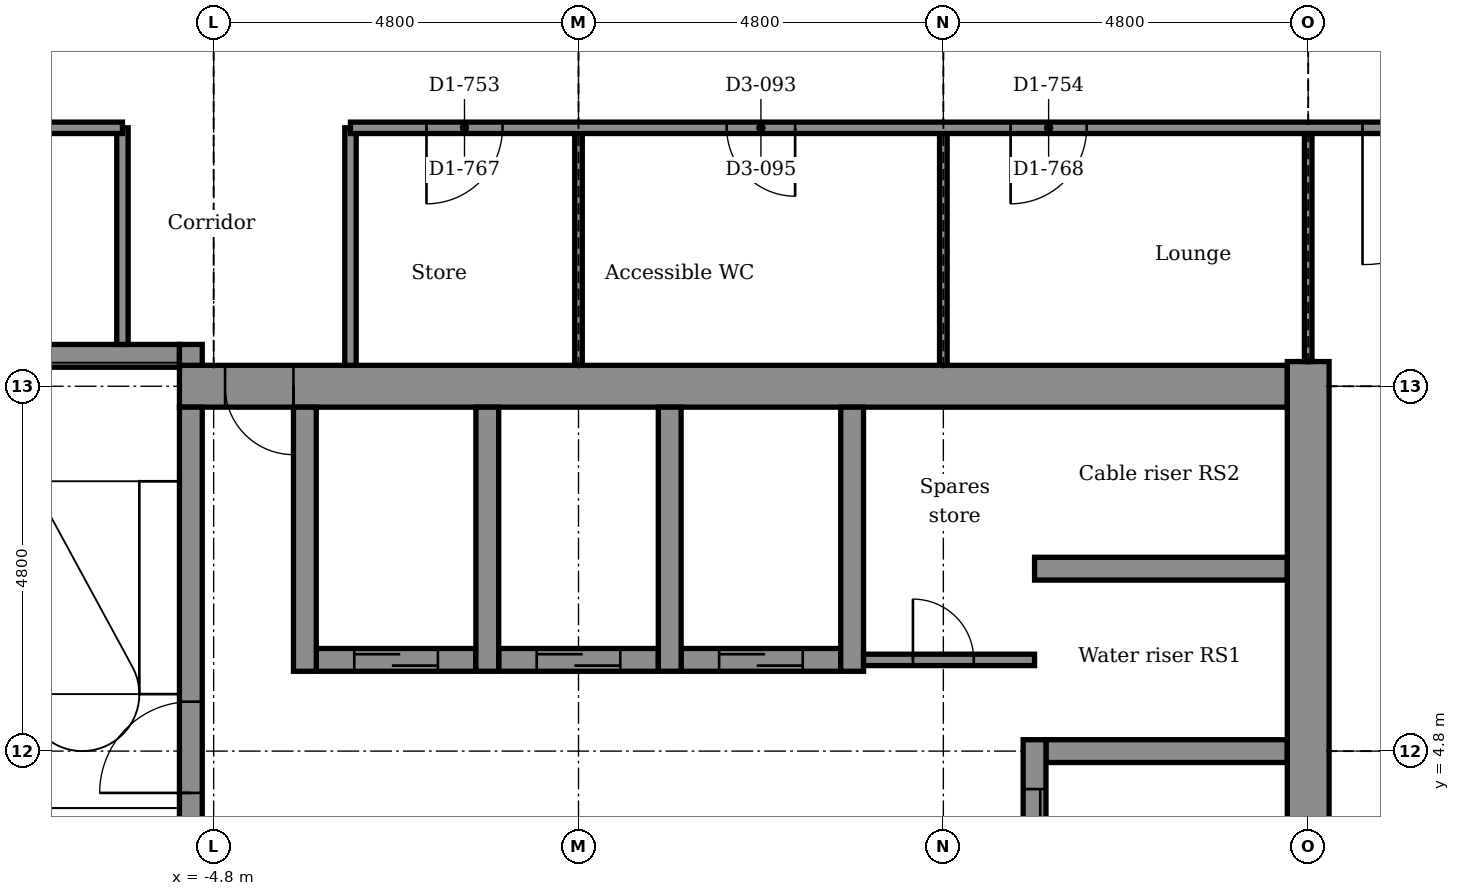
"""IFC4 building model, lengths in metres.
Left out: names, types, materials, properties, quantities, classifications, styles, units other than length and angle.
Written with IfcOpenShell. Run it as: python <this file> out.ifc"""

import sys

from ifc_helpers import new_model, si_unit, direction, frame, frame_2d, origin, place, context, subcontext, project, spatial, rectangle, extrude, element, fill, save


model = new_model("IFC4")
c1 = context("Model", 3, precision=1e-05, world=origin(), true_north=direction((0.0, 1.0)))
c2 = subcontext(c1, "Body", "Model", "MODEL_VIEW")
j1 = project(units=[si_unit("LENGTHUNIT", "METRE"), si_unit("PLANEANGLEUNIT", "RADIAN")], contexts=[c1])
p1 = place(None, origin())
s1 = spatial("IfcSite", under=j1, at=p1, CompositionType="ELEMENT")
p2 = place(p1, origin())
s2 = spatial("IfcBuilding", under=s1, at=p2, CompositionType="ELEMENT")
p3 = place(p2, frame((0.0, 0.0, 289.1)))
s3 = spatial("IfcBuildingStorey", under=s2, at=p3, CompositionType="ELEMENT", Elevation=289.1)
p4 = place(p3, frame((6.15, 4.8, -0.15), z_axis=(0.0, 0.0, 1.0), x_axis=(1.0, 0.0, 0.0)))
e1 = element("IfcWall", 1, at=p4, inside=s3, PredefinedType="STANDARD", context=c2, shape_type="SweptSolid", body=[
    extrude(rectangle(XDim=3.175, YDim=0.3, at=frame_2d((1.587, 0.0))), origin(), (0.0, 0.0, 1.0), 3.9),
])
p5 = place(p3, frame((-3.45, 6.0, -0.15), z_axis=(0.0, 0.0, 1.0), x_axis=(1.0, 0.0, 0.0)))
e2 = element("IfcWall", 2, at=p5, inside=s3, PredefinedType="STANDARD", context=c2, shape_type="SweptSolid", body=[
    extrude(rectangle(XDim=2.1, YDim=0.3, at=frame_2d((1.05, 0.0))), origin(), (0.0, 0.0, 1.0), 3.9),
])
p6 = place(p5, frame((0.5, 0.0, 0.15)))
e3 = element("IfcOpeningElement", 3, at=p6, cuts=e2, PredefinedType="OPENING", context=c2, shape_type="SweptSolid", body=[
    extrude(rectangle(XDim=1.1, YDim=2.1, at=frame_2d((0.55, 1.05))), frame((0.0, 0.16, 0.0), z_axis=(0.0, -1.0, 0.0), x_axis=(1.0, 0.0, 0.0)), (0.0, 0.0, 1.0), 0.32),
])
p7 = place(p3, frame((-1.05, 6.0, -0.15), z_axis=(0.0, 0.0, 1.0), x_axis=(1.0, 0.0, 0.0)))
e4 = element("IfcWall", 4, at=p7, inside=s3, PredefinedType="STANDARD", context=c2, shape_type="SweptSolid", body=[
    extrude(rectangle(XDim=2.1, YDim=0.3, at=frame_2d((1.05, 0.0))), origin(), (0.0, 0.0, 1.0), 3.9),
])
p8 = place(p7, frame((0.5, 0.0, 0.15)))
e5 = element("IfcOpeningElement", 5, at=p8, cuts=e4, PredefinedType="OPENING", context=c2, shape_type="SweptSolid", body=[
    extrude(rectangle(XDim=1.1, YDim=2.1, at=frame_2d((0.55, 1.05))), frame((0.0, 0.16, 0.0), z_axis=(0.0, -1.0, 0.0), x_axis=(1.0, 0.0, 0.0)), (0.0, 0.0, 1.0), 0.32),
])
p9 = place(p3, frame((1.35, 6.0, -0.15), z_axis=(0.0, 0.0, 1.0), x_axis=(1.0, 0.0, 0.0)))
e6 = element("IfcWall", 6, at=p9, inside=s3, PredefinedType="STANDARD", context=c2, shape_type="SweptSolid", body=[
    extrude(rectangle(XDim=2.1, YDim=0.3, at=frame_2d((1.05, 0.0))), origin(), (0.0, 0.0, 1.0), 3.9),
])
p10 = place(p9, frame((0.5, 0.0, 0.15)))
e7 = element("IfcOpeningElement", 7, at=p10, cuts=e6, PredefinedType="OPENING", context=c2, shape_type="SweptSolid", body=[
    extrude(rectangle(XDim=1.1, YDim=2.1, at=frame_2d((0.55, 1.05))), frame((0.0, 0.16, 0.0), z_axis=(0.0, -1.0, 0.0), x_axis=(1.0, 0.0, 0.0)), (0.0, 0.0, 1.0), 0.32),
])
p11 = place(p3, frame((6.0, 7.2, -0.15), z_axis=(0.0, 0.0, 1.0), x_axis=(1.0, 0.0, 0.0)))
e8 = element("IfcWall", 8, at=p11, inside=s3, PredefinedType="STANDARD", context=c2, shape_type="SweptSolid", body=[
    extrude(rectangle(XDim=3.325, YDim=0.3, at=frame_2d((1.663, 0.0))), origin(), (0.0, 0.0, 1.0), 3.9),
])
p12 = place(p3, frame((-5.25, 9.6, -0.15), z_axis=(0.0, 0.0, 1.0), x_axis=(1.0, 0.0, 0.0)))
e9 = element("IfcWall", 9, at=p12, inside=s3, PredefinedType="SHEAR", context=c2, shape_type="SweptSolid", body=[
    extrude(rectangle(XDim=14.575, YDim=0.55, at=frame_2d((7.288, 0.0))), origin(), (0.0, 0.0, 1.0), 3.9),
])
p13 = place(p12, frame((0.6, 0.0, 0.15)))
e10 = element("IfcOpeningElement", 10, at=p13, cuts=e9, PredefinedType="OPENING", context=c2, shape_type="SweptSolid", body=[
    extrude(rectangle(XDim=0.9, YDim=2.1, at=frame_2d((0.45, 1.05))), frame((0.0, 0.285, 0.0), z_axis=(0.0, -1.0, 0.0), x_axis=(1.0, 0.0, 0.0)), (0.0, 0.0, 1.0), 0.57),
])
p14 = place(p3, frame((-9.325, 10.0, -0.15), z_axis=(0.0, 0.0, 1.0), x_axis=(1.0, 0.0, 0.0)))
e11 = element("IfcWall", 11, at=p14, inside=s3, PredefinedType="STANDARD", context=c2, shape_type="SweptSolid", body=[
    extrude(rectangle(XDim=4.075, YDim=0.3, at=frame_2d((2.038, 0.0))), origin(), (0.0, 0.0, 1.0), 3.9),
])
p15 = place(p3, frame((-5.1, 2.25, -0.15), z_axis=(0.0, 0.0, 1.0), x_axis=(0.0, 1.0, 0.0)))
e12 = element("IfcWall", 12, at=p15, inside=s3, PredefinedType="STANDARD", context=c2, shape_type="SweptSolid", body=[
    extrude(rectangle(XDim=7.075, YDim=0.3, at=frame_2d((3.538, 0.0))), origin(), (0.0, 0.0, 1.0), 3.9),
])
p16 = place(p15, frame((2.0, 0.0, 0.15)))
e13 = element("IfcOpeningElement", 13, at=p16, cuts=e12, PredefinedType="OPENING", context=c2, shape_type="SweptSolid", body=[
    extrude(rectangle(XDim=1.2, YDim=2.1, at=frame_2d((0.6, 1.05))), frame((0.0, 0.16, 0.0), z_axis=(0.0, -1.0, 0.0), x_axis=(1.0, 0.0, 0.0)), (0.0, 0.0, 1.0), 0.32),
])
p17 = place(p3, frame((-5.1, 9.875, -0.15), z_axis=(0.0, 0.0, 1.0), x_axis=(0.0, 1.0, 0.0)))
e14 = element("IfcWall", 14, at=p17, inside=s3, PredefinedType="STANDARD", context=c2, shape_type="SweptSolid", body=[
    extrude(rectangle(XDim=0.275, YDim=0.3, at=frame_2d((0.137, 0.0))), origin(), (0.0, 0.0, 1.0), 3.9),
])
for number, where, z_axis, x_axis in (
    (15, (-3.6, 5.85, -0.15), (0.0, 0.0, 1.0), (0.0, 1.0, 0.0)),
    (16, (-1.2, 5.85, -0.15), (0.0, 0.0, 1.0), (0.0, 1.0, 0.0)),
    (17, (1.2, 5.85, -0.15), (0.0, 0.0, 1.0), (0.0, 1.0, 0.0)),
    (18, (3.6, 5.85, -0.15), (0.0, 0.0, 1.0), (0.0, 1.0, 0.0)),
):
    element("IfcWall", number, at=place(p3, frame(where, z_axis=z_axis, x_axis=x_axis)), inside=s3, PredefinedType="STANDARD", context=c2, shape_type="SweptSolid", body=[
        extrude(rectangle(XDim=3.475, YDim=0.3, at=frame_2d((1.737, 0.0))), origin(), (0.0, 0.0, 1.0), 3.9),
    ])
p18 = place(p3, frame((6.0, -2.55, -0.15), z_axis=(0.0, 0.0, 1.0), x_axis=(0.0, 1.0, 0.0)))
e19 = element("IfcWall", 19, at=p18, inside=s3, PredefinedType="STANDARD", context=c2, shape_type="SweptSolid", body=[
    extrude(rectangle(XDim=7.5, YDim=0.3, at=frame_2d((3.75, 0.0))), origin(), (0.0, 0.0, 1.0), 3.9),
])
p19 = place(p18, frame((0.65, 0.0, 0.15)))
e20 = element("IfcOpeningElement", 20, at=p19, cuts=e19, PredefinedType="OPENING", context=c2, shape_type="SweptSolid", body=[
    extrude(rectangle(XDim=1.4, YDim=2.1, at=frame_2d((0.7, 1.05))), frame((0.0, 0.16, 0.0), z_axis=(0.0, -1.0, 0.0), x_axis=(1.0, 0.0, 0.0)), (0.0, 0.0, 1.0), 0.32),
])
p20 = place(p18, frame((3.05, 0.0, 0.15)))
e21 = element("IfcOpeningElement", 21, at=p20, cuts=e19, PredefinedType="OPENING", context=c2, shape_type="SweptSolid", body=[
    extrude(rectangle(XDim=1.4, YDim=2.1, at=frame_2d((0.7, 1.05))), frame((0.0, 0.16, 0.0), z_axis=(0.0, -1.0, 0.0), x_axis=(1.0, 0.0, 0.0)), (0.0, 0.0, 1.0), 0.32),
])
p21 = place(p18, frame((5.45, 0.0, 0.15)))
e22 = element("IfcOpeningElement", 22, at=p21, cuts=e19, PredefinedType="OPENING", context=c2, shape_type="SweptSolid", body=[
    extrude(rectangle(XDim=1.4, YDim=2.1, at=frame_2d((0.7, 1.05))), frame((0.0, 0.16, 0.0), z_axis=(0.0, -1.0, 0.0), x_axis=(1.0, 0.0, 0.0)), (0.0, 0.0, 1.0), 0.32),
])
p22 = place(p3, frame((9.6, -10.15, -0.15), z_axis=(0.0, 0.0, 1.0), x_axis=(0.0, 1.0, 0.0)))
e23 = element("IfcWall", 23, at=p22, inside=s3, PredefinedType="SHEAR", context=c2, shape_type="SweptSolid", body=[
    extrude(rectangle(XDim=20.075, YDim=0.55, at=frame_2d((10.038, 0.0))), origin(), (0.0, 0.0, 1.0), 3.9),
])
p23 = place(p3, frame((9.6, 9.925, 0.0), z_axis=(0.0, 0.0, 1.0), x_axis=(0.0, 1.0, 0.0)))
e24 = element("IfcWall", 24, at=p23, inside=s3, PredefinedType="PARTITIONING", context=c2, shape_type="SweptSolid", body=[
    extrude(rectangle(XDim=3.075, YDim=0.1, at=frame_2d((1.538, 0.0))), origin(), (0.0, 0.0, 1.0), 3.217),
])
for number, where, z_axis, x_axis in (
    (25, (4.8, 9.875, 0.0), (0.0, 0.0, 1.0), (0.0, 1.0, 0.0)),
    (26, (0.0, 9.875, 0.0), (0.0, 0.0, 1.0), (0.0, 1.0, 0.0)),
):
    element("IfcWall", number, at=place(p3, frame(where, z_axis=z_axis, x_axis=x_axis)), inside=s3, PredefinedType="PARTITIONING", context=c2, shape_type="SweptSolid", body=[
        extrude(rectangle(XDim=3.125, YDim=0.1, at=frame_2d((1.562, 0.0))), origin(), (0.0, 0.0, 1.0), 3.217),
    ])
p24 = place(p3, frame((-3.0, 9.875, 0.0), z_axis=(0.0, 0.0, 1.0), x_axis=(0.0, 1.0, 0.0)))
e27 = element("IfcWall", 27, at=p24, inside=s3, PredefinedType="PARTITIONING", context=c2, shape_type="SweptSolid", body=[
    extrude(rectangle(XDim=3.125, YDim=0.15, at=frame_2d((1.562, 0.0))), origin(), (0.0, 0.0, 1.0), 3.75),
])
p25 = place(p3, frame((-6.0, 10.15, 0.0), z_axis=(0.0, 0.0, 1.0), x_axis=(0.0, 1.0, 0.0)))
e28 = element("IfcWall", 28, at=p25, inside=s3, PredefinedType="PARTITIONING", context=c2, shape_type="SweptSolid", body=[
    extrude(rectangle(XDim=2.85, YDim=0.15, at=frame_2d((1.425, 0.0))), origin(), (0.0, 0.0, 1.0), 3.75),
])
p26 = place(p3, frame((3.75, 6.0, 0.0), z_axis=(0.0, 0.0, 1.0), x_axis=(1.0, 0.0, 0.0)))
e29 = element("IfcWall", 29, at=p26, inside=s3, PredefinedType="PARTITIONING", context=c2, shape_type="SweptSolid", body=[
    extrude(rectangle(XDim=2.25, YDim=0.15, at=frame_2d((1.125, 0.0))), origin(), (0.0, 0.0, 1.0), 3.75),
])
p27 = place(p26, frame((0.65, 0.0, 0.0)))
e30 = element("IfcOpeningElement", 30, at=p27, cuts=e29, PredefinedType="OPENING", context=c2, shape_type="SweptSolid", body=[
    extrude(rectangle(XDim=0.8, YDim=2.1, at=frame_2d((0.4, 1.05))), frame((0.0, 0.085, 0.0), z_axis=(0.0, -1.0, 0.0), x_axis=(1.0, 0.0, 0.0)), (0.0, 0.0, 1.0), 0.17),
])
p28 = place(p3, frame((-14.624, 13.0, 0.0), z_axis=(0.0, 0.0, 1.0), x_axis=(1.0, 0.0, 0.0)))
e31 = element("IfcWall", 31, at=p28, inside=s3, PredefinedType="PARTITIONING", context=c2, shape_type="SweptSolid", body=[
    extrude(rectangle(XDim=8.624, YDim=0.15, at=frame_2d((4.312, 0.0))), origin(), (0.0, 0.0, 1.0), 3.75),
])
p29 = place(p28, frame((5.674, 0.0, 0.0)))
e32 = element("IfcOpeningElement", 32, at=p29, cuts=e31, PredefinedType="OPENING", context=c2, shape_type="SweptSolid", body=[
    extrude(rectangle(XDim=0.9, YDim=2.1, at=frame_2d((0.45, 1.05))), frame((0.0, 0.085, 0.0), z_axis=(0.0, -1.0, 0.0), x_axis=(1.0, 0.0, 0.0)), (0.0, 0.0, 1.0), 0.17),
])
p30 = place(p28, frame((0.502, 0.0, 0.0)))
e33 = element("IfcOpeningElement", 33, at=p30, cuts=e31, PredefinedType="OPENING", context=c2, shape_type="SweptSolid", body=[
    extrude(rectangle(XDim=1.8, YDim=2.1, at=frame_2d((0.9, 1.05))), frame((0.0, 0.085, 0.0), z_axis=(0.0, -1.0, 0.0), x_axis=(1.0, 0.0, 0.0)), (0.0, 0.0, 1.0), 0.17),
])
p31 = place(p3, frame((-3.0, 13.0, 0.0), z_axis=(0.0, 0.0, 1.0), x_axis=(1.0, 0.0, 0.0)))
e34 = element("IfcWall", 34, at=p31, inside=s3, PredefinedType="PARTITIONING", context=c2, shape_type="SweptSolid", body=[
    extrude(rectangle(XDim=17.624, YDim=0.15, at=frame_2d((8.812, 0.0))), origin(), (0.0, 0.0, 1.0), 3.75),
])
p32 = place(p31, frame((1.0, 0.0, 0.0)))
e35 = element("IfcOpeningElement", 35, at=p32, cuts=e34, PredefinedType="OPENING", context=c2, shape_type="SweptSolid", body=[
    extrude(rectangle(XDim=1.0, YDim=2.1, at=frame_2d((0.5, 1.05))), frame((0.0, 0.085, 0.0), z_axis=(0.0, -1.0, 0.0), x_axis=(1.0, 0.0, 0.0)), (0.0, 0.0, 1.0), 0.17),
])
p33 = place(p31, frame((4.95, 0.0, 0.0)))
e36 = element("IfcOpeningElement", 36, at=p33, cuts=e34, PredefinedType="OPENING", context=c2, shape_type="SweptSolid", body=[
    extrude(rectangle(XDim=0.9, YDim=2.1, at=frame_2d((0.45, 1.05))), frame((0.0, 0.085, 0.0), z_axis=(0.0, -1.0, 0.0), x_axis=(1.0, 0.0, 0.0)), (0.0, 0.0, 1.0), 0.17),
])
p34 = place(p31, frame((8.685, 0.0, 0.0)))
e37 = element("IfcOpeningElement", 37, at=p34, cuts=e34, PredefinedType="OPENING", context=c2, shape_type="SweptSolid", body=[
    extrude(rectangle(XDim=1.0, YDim=2.1, at=frame_2d((0.5, 1.05))), frame((0.0, 0.085, 0.0), z_axis=(0.0, -1.0, 0.0), x_axis=(1.0, 0.0, 0.0)), (0.0, 0.0, 1.0), 0.17),
])
p35 = place(p31, frame((13.314, 0.0, 0.0)))
e38 = element("IfcOpeningElement", 38, at=p35, cuts=e34, PredefinedType="OPENING", context=c2, shape_type="SweptSolid", body=[
    extrude(rectangle(XDim=1.8, YDim=2.1, at=frame_2d((0.9, 1.05))), frame((0.0, 0.085, 0.0), z_axis=(0.0, -1.0, 0.0), x_axis=(1.0, 0.0, 0.0)), (0.0, 0.0, 1.0), 0.17),
])
p36 = place(p27, origin())
e39 = element("IfcDoor", 39, at=p36, inside=s3, OperationType="SINGLE_SWING_LEFT", PredefinedType="DOOR", context=c2, shape_type="SweptSolid", body=[
    extrude(rectangle(XDim=0.8, YDim=2.1, at=frame_2d((0.4, 1.05))), frame((0.0, 0.025, 0.0), z_axis=(0.0, -1.0, 0.0), x_axis=(1.0, 0.0, 0.0)), (0.0, 0.0, 1.0), 0.05),
])
fill(e30, e39)
p37 = place(p32, frame((1.0, 0.0, 0.0), z_axis=(0.0, 0.0, 1.0), x_axis=(-1.0, 0.0, 0.0)))
e40 = element("IfcDoor", 40, at=p37, inside=s3, OperationType="SINGLE_SWING_LEFT", PredefinedType="DOOR", context=c2, shape_type="SweptSolid", body=[
    extrude(rectangle(XDim=1.0, YDim=2.1, at=frame_2d((0.5, 1.05))), frame((0.0, 0.025, 0.0), z_axis=(0.0, -1.0, 0.0), x_axis=(1.0, 0.0, 0.0)), (0.0, 0.0, 1.0), 0.05),
])
fill(e35, e40)
p38 = place(p33, frame((0.9, 0.0, 0.0), z_axis=(0.0, 0.0, 1.0), x_axis=(-1.0, 0.0, 0.0)))
e41 = element("IfcDoor", 41, at=p38, inside=s3, OperationType="SINGLE_SWING_RIGHT", PredefinedType="DOOR", context=c2, shape_type="SweptSolid", body=[
    extrude(rectangle(XDim=0.9, YDim=2.1, at=frame_2d((0.45, 1.05))), frame((0.0, 0.025, 0.0), z_axis=(0.0, -1.0, 0.0), x_axis=(1.0, 0.0, 0.0)), (0.0, 0.0, 1.0), 0.05),
])
fill(e36, e41)
p39 = place(p34, frame((1.0, 0.0, 0.0), z_axis=(0.0, 0.0, 1.0), x_axis=(-1.0, 0.0, 0.0)))
e42 = element("IfcDoor", 42, at=p39, inside=s3, OperationType="SINGLE_SWING_LEFT", PredefinedType="DOOR", context=c2, shape_type="SweptSolid", body=[
    extrude(rectangle(XDim=1.0, YDim=2.1, at=frame_2d((0.5, 1.05))), frame((0.0, 0.025, 0.0), z_axis=(0.0, -1.0, 0.0), x_axis=(1.0, 0.0, 0.0)), (0.0, 0.0, 1.0), 0.05),
])
fill(e37, e42)
p40 = place(p35, frame((1.8, 0.0, 0.0), z_axis=(0.0, 0.0, 1.0), x_axis=(-1.0, 0.0, 0.0)))
e43 = element("IfcDoor", 43, at=p40, inside=s3, OperationType="SINGLE_SWING_LEFT", PredefinedType="DOOR", context=c2, shape_type="SweptSolid", body=[
    extrude(rectangle(XDim=1.8, YDim=2.1, at=frame_2d((0.9, 1.05))), frame((0.0, 0.025, 0.0), z_axis=(0.0, -1.0, 0.0), x_axis=(1.0, 0.0, 0.0)), (0.0, 0.0, 1.0), 0.05),
])
fill(e38, e43)
p41 = place(p21, origin())
e44 = element("IfcDoor", 44, at=p41, inside=s3, OperationType="DOUBLE_DOOR_SLIDING", PredefinedType="DOOR", context=c2, shape_type="SweptSolid", body=[
    extrude(rectangle(XDim=1.4, YDim=2.1, at=frame_2d((0.7, 1.05))), frame((0.0, 0.025, 0.0), z_axis=(0.0, -1.0, 0.0), x_axis=(1.0, 0.0, 0.0)), (0.0, 0.0, 1.0), 0.05),
])
fill(e22, e44)
p42 = place(p6, origin())
e45 = element("IfcDoor", 45, at=p42, inside=s3, OperationType="DOUBLE_DOOR_SLIDING", PredefinedType="DOOR", context=c2, shape_type="SweptSolid", body=[
    extrude(rectangle(XDim=1.1, YDim=2.1, at=frame_2d((0.55, 1.05))), frame((0.0, 0.025, 0.0), z_axis=(0.0, -1.0, 0.0), x_axis=(1.0, 0.0, 0.0)), (0.0, 0.0, 1.0), 0.05),
])
fill(e3, e45)
p43 = place(p8, origin())
e46 = element("IfcDoor", 46, at=p43, inside=s3, OperationType="DOUBLE_DOOR_SLIDING", PredefinedType="DOOR", context=c2, shape_type="SweptSolid", body=[
    extrude(rectangle(XDim=1.1, YDim=2.1, at=frame_2d((0.55, 1.05))), frame((0.0, 0.025, 0.0), z_axis=(0.0, -1.0, 0.0), x_axis=(1.0, 0.0, 0.0)), (0.0, 0.0, 1.0), 0.05),
])
fill(e5, e46)
p44 = place(p10, origin())
e47 = element("IfcDoor", 47, at=p44, inside=s3, OperationType="DOUBLE_DOOR_SLIDING", PredefinedType="DOOR", context=c2, shape_type="SweptSolid", body=[
    extrude(rectangle(XDim=1.1, YDim=2.1, at=frame_2d((0.55, 1.05))), frame((0.0, 0.025, 0.0), z_axis=(0.0, -1.0, 0.0), x_axis=(1.0, 0.0, 0.0)), (0.0, 0.0, 1.0), 0.05),
])
fill(e7, e47)
p45 = place(p16, origin())
e48 = element("IfcDoor", 48, at=p45, inside=s3, OperationType="SINGLE_SWING_LEFT", PredefinedType="DOOR", context=c2, shape_type="SweptSolid", body=[
    extrude(rectangle(XDim=1.2, YDim=2.1, at=frame_2d((0.6, 1.05))), frame((0.0, 0.025, 0.0), z_axis=(0.0, -1.0, 0.0), x_axis=(1.0, 0.0, 0.0)), (0.0, 0.0, 1.0), 0.05),
])
fill(e13, e48)
p46 = place(p13, frame((0.9, 0.0, 0.0), z_axis=(0.0, 0.0, 1.0), x_axis=(-1.0, 0.0, 0.0)))
e49 = element("IfcDoor", 49, at=p46, inside=s3, OperationType="SINGLE_SWING_RIGHT", PredefinedType="DOOR", context=c2, shape_type="SweptSolid", body=[
    extrude(rectangle(XDim=0.9, YDim=2.1, at=frame_2d((0.45, 1.05))), frame((0.0, 0.025, 0.0), z_axis=(0.0, -1.0, 0.0), x_axis=(1.0, 0.0, 0.0)), (0.0, 0.0, 1.0), 0.05),
])
fill(e10, e49)
save(model, sys.argv[1])
